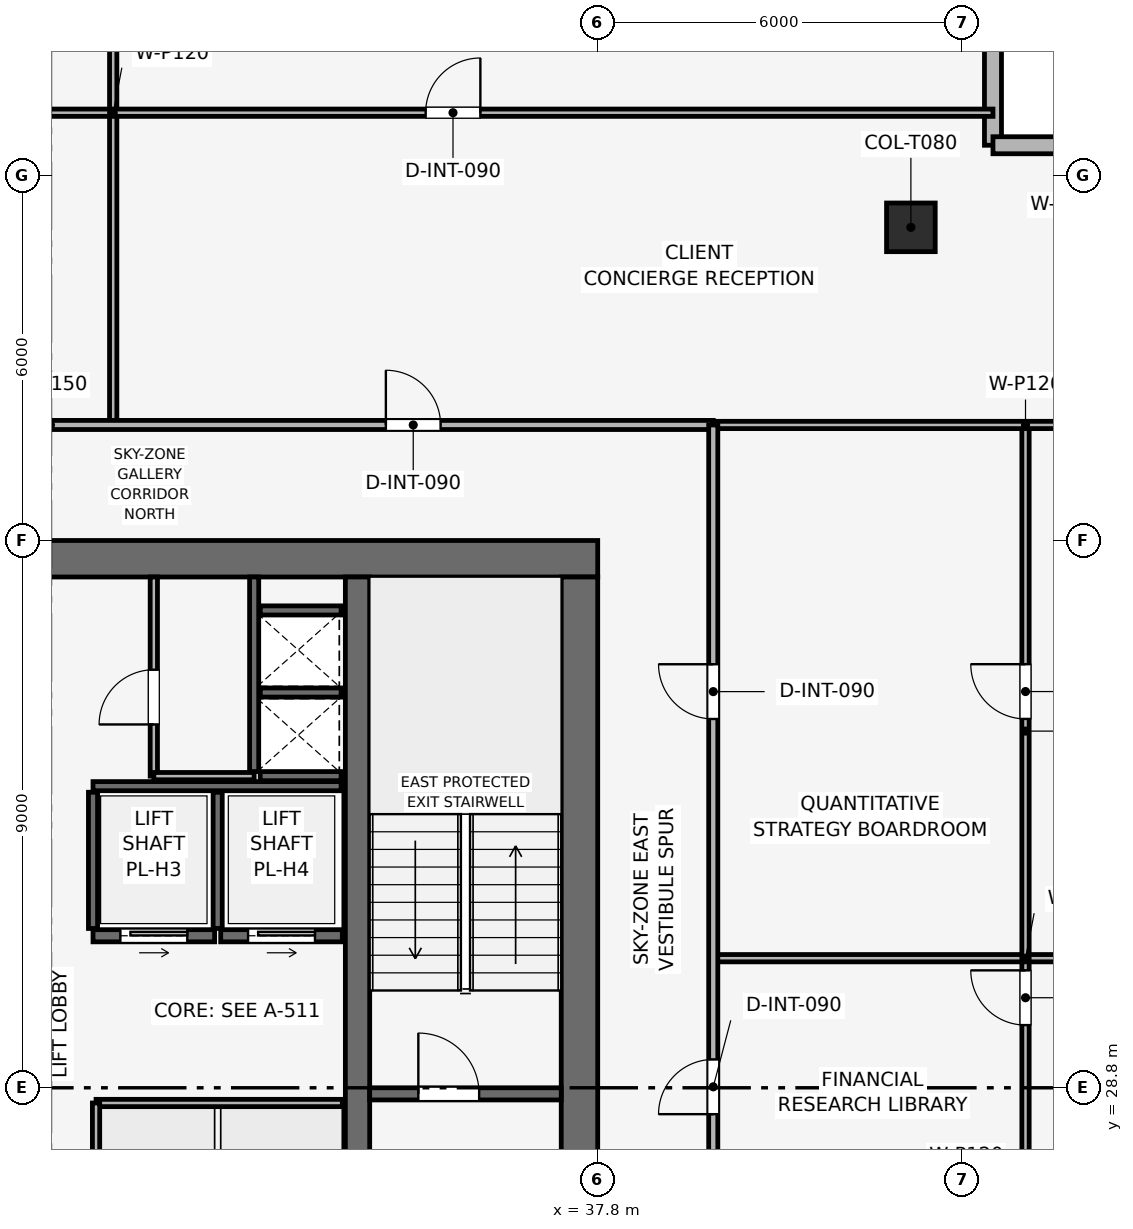
"""IFC4 building model, lengths in metres.
Left out: names, types, materials, properties, quantities, classifications, styles, units other than length and angle.
Written with IfcOpenShell. Run it as: python <this file> out.ifc"""

import sys

from ifc_helpers import new_model, si_unit, direction, frame, frame_2d, origin, origin_2d, place, context, subcontext, project, spatial, rectangle, extrude, element, fill, save


model = new_model("IFC4")
c1 = context("Model", 3, precision=1e-05, world=origin(), true_north=direction((0.0, 1.0)))
c2 = subcontext(c1, "Body", "Model", "MODEL_VIEW")
j1 = project(units=[si_unit("LENGTHUNIT", "METRE"), si_unit("PLANEANGLEUNIT", "RADIAN")], contexts=[c1])
p1 = place(None, origin())
s1 = spatial("IfcSite", under=j1, at=p1, CompositionType="ELEMENT")
p2 = place(p1, origin())
s2 = spatial("IfcBuilding", under=s1, at=p2, CompositionType="ELEMENT")
p3 = place(p2, frame((0.0, 0.0, 348.0)))
s3 = spatial("IfcBuildingStorey", under=s2, at=p3, CompositionType="ELEMENT", Elevation=348.0)
p4 = place(p3, frame((19.8, 37.5, 0.0), z_axis=(0.0, 0.0, 1.0), x_axis=(1.0, 0.0, 0.0)))
e1 = element("IfcWall", 1, at=p4, inside=s3, PredefinedType="SHEAR", context=c2, shape_type="SweptSolid", body=[
    extrude(rectangle(XDim=18.0, YDim=0.6, at=frame_2d((9.0, 0.0))), origin(), (0.0, 0.0, 1.0), 3.75),
])
p5 = place(p4, frame((7.05, 0.0, 0.0)))
e2 = element("IfcOpeningElement", 2, at=p5, cuts=e1, PredefinedType="OPENING", context=c2, shape_type="SweptSolid", body=[
    extrude(rectangle(XDim=1.1, YDim=2.15, at=frame_2d((0.55, 1.075))), frame((0.0, 0.31, 0.0), z_axis=(0.0, -1.0, 0.0), x_axis=(1.0, 0.0, 0.0)), (0.0, 0.0, 1.0), 0.62),
])
p6 = place(p3, frame((37.5, 20.4, 0.0), z_axis=(0.0, 0.0, 1.0), x_axis=(0.0, 1.0, 0.0)))
e3 = element("IfcWall", 3, at=p6, inside=s3, PredefinedType="SHEAR", context=c2, shape_type="SweptSolid", body=[
    extrude(rectangle(XDim=16.8, YDim=0.6, at=frame_2d((8.4, 0.0))), origin(), (0.0, 0.0, 1.0), 3.75),
])
p7 = place(p6, frame((4.9, 0.0, 0.0)))
e4 = element("IfcOpeningElement", 4, at=p7, cuts=e3, PredefinedType="OPENING", context=c2, shape_type="SweptSolid", body=[
    extrude(rectangle(XDim=1.1, YDim=2.15, at=frame_2d((0.55, 1.075))), frame((0.0, 0.31, 0.0), z_axis=(0.0, -1.0, 0.0), x_axis=(1.0, 0.0, 0.0)), (0.0, 0.0, 1.0), 0.62),
])
p8 = place(p3, frame((33.85, 20.4, 0.0), z_axis=(0.0, 0.0, 1.0), x_axis=(0.0, 1.0, 0.0)))
e5 = element("IfcWall", 5, at=p8, inside=s3, PredefinedType="SHEAR", context=c2, shape_type="SweptSolid", body=[
    extrude(rectangle(XDim=16.8, YDim=0.4, at=frame_2d((8.4, 0.0))), origin(), (0.0, 0.0, 1.0), 3.75),
])
p9 = place(p3, frame((42.95, 42.95, 0.003), z_axis=(0.0, 0.0, 1.0), x_axis=(1.0, 0.0, 0.0)))
e6 = element("IfcColumn", 6, at=p9, inside=s3, PredefinedType="COLUMN", context=c2, shape_type="SweptSolid", body=[
    extrude(rectangle(XDim=0.8, YDim=0.8, at=origin_2d()), origin(), (0.0, 0.0, 1.0), 3.504),
])
p10 = place(p3, frame((44.3, 49.97, 0.0), z_axis=(0.0, 0.0, 1.0), x_axis=(0.0, -1.0, 0.0)))
e7 = element("IfcWall", 7, at=p10, inside=s3, PredefinedType="SOLIDWALL", context=c2, shape_type="SweptSolid", body=[
    extrude(rectangle(XDim=5.67, YDim=0.28, at=frame_2d((2.835, 0.0))), origin(), (0.0, 0.0, 1.0), 3.51),
])
p11 = place(p10, frame((1.585, 0.0, 0.9)))
e8 = element("IfcOpeningElement", 8, at=p11, cuts=e7, PredefinedType="OPENING", context=c2, shape_type="SweptSolid", body=[
    extrude(rectangle(XDim=2.5, YDim=1.9, at=frame_2d((1.25, 0.95))), frame((0.0, 0.15, 0.0), z_axis=(0.0, -1.0, 0.0), x_axis=(1.0, 0.0, 0.0)), (0.0, 0.0, 1.0), 0.3),
])
p12 = place(p3, frame((44.3, 44.3, 0.0), z_axis=(0.0, 0.0, 1.0), x_axis=(1.0, 0.0, 0.0)))
e9 = element("IfcWall", 9, at=p12, inside=s3, PredefinedType="SOLIDWALL", context=c2, shape_type="SweptSolid", body=[
    extrude(rectangle(XDim=5.67, YDim=0.28, at=frame_2d((2.835, 0.0))), origin(), (0.0, 0.0, 1.0), 3.51),
])
p13 = place(p12, frame((1.585, 0.0, 0.9)))
e10 = element("IfcOpeningElement", 10, at=p13, cuts=e9, PredefinedType="OPENING", context=c2, shape_type="SweptSolid", body=[
    extrude(rectangle(XDim=2.5, YDim=1.9, at=frame_2d((1.25, 0.95))), frame((0.0, 0.15, 0.0), z_axis=(0.0, -1.0, 0.0), x_axis=(1.0, 0.0, 0.0)), (0.0, 0.0, 1.0), 0.3),
])
p14 = place(p3, frame((34.05, 28.7, 0.0), z_axis=(0.0, 0.0, 1.0), x_axis=(1.0, 0.0, 0.0)))
e11 = element("IfcWall", 11, at=p14, inside=s3, PredefinedType="SHEAR", context=c2, shape_type="SweptSolid", body=[
    extrude(rectangle(XDim=3.15, YDim=0.2, at=frame_2d((1.575, 0.0))), origin(), (0.0, 0.0, 1.0), 3.51),
])
p15 = place(p14, frame((0.8, 0.0, 0.0)))
e12 = element("IfcOpeningElement", 12, at=p15, cuts=e11, PredefinedType="OPENING", context=c2, shape_type="SweptSolid", body=[
    extrude(rectangle(XDim=1.0, YDim=2.1, at=frame_2d((0.5, 1.05))), frame((0.0, 0.11, 0.0), z_axis=(0.0, -1.0, 0.0), x_axis=(1.0, 0.0, 0.0)), (0.0, 0.0, 1.0), 0.22),
])
p16 = place(p3, frame((32.15, 34.0, 0.0), z_axis=(0.0, 0.0, 1.0), x_axis=(0.0, 1.0, 0.0)))
e13 = element("IfcWall", 13, at=p16, inside=s3, PredefinedType="SHEAR", context=c2, shape_type="SweptSolid", body=[
    extrude(rectangle(XDim=3.2, YDim=0.15, at=frame_2d((1.6, 0.0))), origin(), (0.0, 0.0, 1.0), 3.51),
])
for number, where, z_axis, x_axis in (
    (14, (32.25, 33.925, 0.0), (0.0, 0.0, 1.0), (1.0, 0.0, 0.0)),
    (15, (32.25, 35.3, 0.0), (0.0, 0.0, 1.0), (1.0, 0.0, 0.0)),
):
    element("IfcWall", number, at=place(p3, frame(where, z_axis=z_axis, x_axis=x_axis)), inside=s3, PredefinedType="SHEAR", context=c2, shape_type="SweptSolid", body=[
        extrude(rectangle(XDim=1.33, YDim=0.15, at=frame_2d((0.665, 0.0))), origin(), (0.0, 0.0, 1.0), 3.51),
    ])
p17 = place(p3, frame((29.5, 31.3, 0.0), z_axis=(0.0, 0.0, 1.0), x_axis=(1.0, 0.0, 0.0)))
e16 = element("IfcWall", 16, at=p17, inside=s3, PredefinedType="SHEAR", context=c2, shape_type="SweptSolid", body=[
    extrude(rectangle(XDim=2.0, YDim=0.2, at=frame_2d((1.0, 0.0))), origin(), (0.0, 0.0, 1.0), 3.51),
])
p18 = place(p17, frame((0.45, 0.0, 0.0)))
e17 = element("IfcOpeningElement", 17, at=p18, cuts=e16, PredefinedType="OPENING", context=c2, shape_type="SweptSolid", body=[
    extrude(rectangle(XDim=1.1, YDim=2.15, at=frame_2d((0.55, 1.075))), frame((0.0, 0.11, 0.0), z_axis=(0.0, -1.0, 0.0), x_axis=(1.0, 0.0, 0.0)), (0.0, 0.0, 1.0), 0.22),
])
p19 = place(p3, frame((31.6, 31.3, 0.0), z_axis=(0.0, 0.0, 1.0), x_axis=(1.0, 0.0, 0.0)))
e18 = element("IfcWall", 18, at=p19, inside=s3, PredefinedType="SHEAR", context=c2, shape_type="SweptSolid", body=[
    extrude(rectangle(XDim=2.0, YDim=0.2, at=frame_2d((1.0, 0.0))), origin(), (0.0, 0.0, 1.0), 3.51),
])
p20 = place(p19, frame((0.45, 0.0, 0.0)))
e19 = element("IfcOpeningElement", 19, at=p20, cuts=e18, PredefinedType="OPENING", context=c2, shape_type="SweptSolid", body=[
    extrude(rectangle(XDim=1.1, YDim=2.15, at=frame_2d((0.55, 1.075))), frame((0.0, 0.11, 0.0), z_axis=(0.0, -1.0, 0.0), x_axis=(1.0, 0.0, 0.0)), (0.0, 0.0, 1.0), 0.22),
])
p21 = place(p3, frame((32.25, 36.65, 0.0), z_axis=(0.0, 0.0, 1.0), x_axis=(1.0, 0.0, 0.0)))
e20 = element("IfcWall", 20, at=p21, inside=s3, PredefinedType="SHEAR", context=c2, shape_type="SweptSolid", body=[
    extrude(rectangle(XDim=1.33, YDim=0.15, at=frame_2d((0.665, 0.0))), origin(), (0.0, 0.0, 1.0), 3.51),
])
p22 = place(p3, frame((29.5, 33.76, 0.0), z_axis=(0.0, 0.0, 1.0), x_axis=(1.0, 0.0, 0.0)))
e21 = element("IfcWall", 21, at=p22, inside=s3, PredefinedType="SHEAR", context=c2, shape_type="SweptSolid", body=[
    extrude(rectangle(XDim=4.08, YDim=0.15, at=frame_2d((2.04, 0.0))), origin(), (0.0, 0.0, 1.0), 3.51),
])
for number, where, z_axis, x_axis in (
    (22, (29.5, 31.42, 0.0), (0.0, 0.0, 1.0), (0.0, 1.0, 0.0)),
    (23, (31.55, 31.42, 0.0), (0.0, 0.0, 1.0), (0.0, 1.0, 0.0)),
):
    element("IfcWall", number, at=place(p3, frame(where, z_axis=z_axis, x_axis=x_axis)), inside=s3, PredefinedType="SHEAR", context=c2, shape_type="SweptSolid", body=[
        extrude(rectangle(XDim=2.24, YDim=0.15, at=frame_2d((1.12, 0.0))), origin(), (0.0, 0.0, 1.0), 3.51),
    ])
p23 = place(p3, frame((30.5, 33.925, 0.0), z_axis=(0.0, 0.0, 1.0), x_axis=(0.0, 1.0, 0.0)))
e24 = element("IfcWall", 24, at=p23, inside=s3, PredefinedType="PARTITIONING", context=c2, shape_type="SweptSolid", body=[
    extrude(rectangle(XDim=3.275, YDim=0.12, at=frame_2d((1.637, 0.0))), origin(), (0.0, 0.0, 1.0), 3.51),
])
p24 = place(p23, frame((0.85, 0.0, 0.0)))
e25 = element("IfcOpeningElement", 25, at=p24, cuts=e24, PredefinedType="OPENING", context=c2, shape_type="SweptSolid", body=[
    extrude(rectangle(XDim=0.9, YDim=2.1, at=frame_2d((0.45, 1.05))), frame((0.0, 0.07, 0.0), z_axis=(0.0, -1.0, 0.0), x_axis=(1.0, 0.0, 0.0)), (0.0, 0.0, 1.0), 0.14),
])
p25 = place(p3, frame((30.5, 33.925, 0.0), z_axis=(0.0, 0.0, 1.0), x_axis=(1.0, 0.0, 0.0)))
e26 = element("IfcWall", 26, at=p25, inside=s3, PredefinedType="PARTITIONING", context=c2, shape_type="SweptSolid", body=[
    extrude(rectangle(XDim=1.65, YDim=0.12, at=frame_2d((0.825, 0.0))), origin(), (0.0, 0.0, 1.0), 3.51),
])
p26 = place(p3, frame((29.55, 28.55, 0.0), z_axis=(0.0, 0.0, 1.0), x_axis=(1.0, 0.0, 0.0)))
e27 = element("IfcWall", 27, at=p26, inside=s3, PredefinedType="PARTITIONING", context=c2, shape_type="SweptSolid", body=[
    extrude(rectangle(XDim=4.05, YDim=0.12, at=frame_2d((2.025, 0.0))), origin(), (0.0, 0.0, 1.0), 3.51),
])
p27 = place(p3, frame((29.55, 25.95, 0.0), z_axis=(0.0, 0.0, 1.0), x_axis=(0.0, 1.0, 0.0)))
e28 = element("IfcWall", 28, at=p27, inside=s3, PredefinedType="PARTITIONING", context=c2, shape_type="SweptSolid", body=[
    extrude(rectangle(XDim=2.6, YDim=0.12, at=frame_2d((1.3, 0.0))), origin(), (0.0, 0.0, 1.0), 3.51),
])
p28 = place(p3, frame((13.3, 44.835, 0.0), z_axis=(0.0, 0.0, 1.0), x_axis=(1.0, 0.0, 0.0)))
e29 = element("IfcWall", 29, at=p28, inside=s3, PredefinedType="PARTITIONING", context=c2, shape_type="SweptSolid", body=[
    extrude(rectangle(XDim=16.532, YDim=0.12, at=frame_2d((8.266, 0.0))), origin(), (0.0, 0.0, 1.0), 3.095),
])
p29 = place(p28, frame((8.451, 0.0, 0.0)))
e30 = element("IfcOpeningElement", 30, at=p29, cuts=e29, PredefinedType="OPENING", context=c2, shape_type="SweptSolid", body=[
    extrude(rectangle(XDim=0.9, YDim=2.1, at=frame_2d((0.45, 1.05))), frame((0.0, 0.07, 0.0), z_axis=(0.0, -1.0, 0.0), x_axis=(1.0, 0.0, 0.0)), (0.0, 0.0, 1.0), 0.14),
])
p30 = place(p3, frame((29.832, 39.7, 0.0), z_axis=(0.0, 0.0, 1.0), x_axis=(0.0, 1.0, 0.0)))
e31 = element("IfcWall", 31, at=p30, inside=s3, PredefinedType="PARTITIONING", context=c2, shape_type="SweptSolid", body=[
    extrude(rectangle(XDim=10.27, YDim=0.12, at=frame_2d((5.135, 0.0))), origin(), (0.0, 0.0, 1.0), 3.135),
])
p31 = place(p3, frame((29.832, 44.835, 0.0), z_axis=(0.0, 0.0, 1.0), x_axis=(1.0, 0.0, 0.0)))
e32 = element("IfcWall", 32, at=p31, inside=s3, PredefinedType="PARTITIONING", context=c2, shape_type="SweptSolid", body=[
    extrude(rectangle(XDim=14.468, YDim=0.12, at=frame_2d((7.234, 0.0))), origin(), (0.0, 0.0, 1.0), 3.095),
])
p32 = place(p31, frame((5.138, 0.0, 0.0)))
e33 = element("IfcOpeningElement", 33, at=p32, cuts=e32, PredefinedType="OPENING", context=c2, shape_type="SweptSolid", body=[
    extrude(rectangle(XDim=0.9, YDim=2.1, at=frame_2d((0.45, 1.05))), frame((0.0, 0.07, 0.0), z_axis=(0.0, -1.0, 0.0), x_axis=(1.0, 0.0, 0.0)), (0.0, 0.0, 1.0), 0.14),
])
p33 = place(p3, frame((44.835, 26.7, 0.0), z_axis=(0.0, 0.0, 1.0), x_axis=(0.0, 1.0, 0.0)))
e34 = element("IfcWall", 34, at=p33, inside=s3, PredefinedType="PARTITIONING", context=c2, shape_type="SweptSolid", body=[
    extrude(rectangle(XDim=4.231, YDim=0.12, at=frame_2d((2.115, 0.0))), origin(), (0.0, 0.0, 1.0), 3.095),
])
p34 = place(p33, frame((3.131, 0.0, 0.0)))
e35 = element("IfcOpeningElement", 35, at=p34, cuts=e34, PredefinedType="OPENING", context=c2, shape_type="SweptSolid", body=[
    extrude(rectangle(XDim=0.9, YDim=2.1, at=frame_2d((0.45, 1.05))), frame((0.0, 0.07, 0.0), z_axis=(0.0, -1.0, 0.0), x_axis=(1.0, 0.0, 0.0)), (0.0, 0.0, 1.0), 0.14),
])
p35 = place(p3, frame((39.7, 30.931, 0.0), z_axis=(0.0, 0.0, 1.0), x_axis=(1.0, 0.0, 0.0)))
e36 = element("IfcWall", 36, at=p35, inside=s3, PredefinedType="PARTITIONING", context=c2, shape_type="SweptSolid", body=[
    extrude(rectangle(XDim=10.27, YDim=0.12, at=frame_2d((5.135, 0.0))), origin(), (0.0, 0.0, 1.0), 3.135),
])
p36 = place(p3, frame((44.835, 30.931, 0.0), z_axis=(0.0, 0.0, 1.0), x_axis=(0.0, 1.0, 0.0)))
e37 = element("IfcWall", 37, at=p36, inside=s3, PredefinedType="PARTITIONING", context=c2, shape_type="SweptSolid", body=[
    extrude(rectangle(XDim=8.769, YDim=0.12, at=frame_2d((4.385, 0.0))), origin(), (0.0, 0.0, 1.0), 3.095),
])
p37 = place(p36, frame((3.935, 0.0, 0.0)))
e38 = element("IfcOpeningElement", 38, at=p37, cuts=e37, PredefinedType="OPENING", context=c2, shape_type="SweptSolid", body=[
    extrude(rectangle(XDim=0.9, YDim=2.1, at=frame_2d((0.45, 1.05))), frame((0.0, 0.07, 0.0), z_axis=(0.0, -1.0, 0.0), x_axis=(1.0, 0.0, 0.0)), (0.0, 0.0, 1.0), 0.14),
])
p38 = place(p3, frame((39.7, 39.7, 0.0), z_axis=(0.0, 0.0, 1.0), x_axis=(1.0, 0.0, 0.0)))
e39 = element("IfcWall", 39, at=p38, inside=s3, PredefinedType="PARTITIONING", context=c2, shape_type="SweptSolid", body=[
    extrude(rectangle(XDim=10.27, YDim=0.12, at=frame_2d((5.135, 0.0))), origin(), (0.0, 0.0, 1.0), 3.095),
])
p39 = place(p3, frame((17.9, 39.7, 0.0), z_axis=(0.0, 0.0, 1.0), x_axis=(1.0, 0.0, 0.0)))
e40 = element("IfcWall", 40, at=p39, inside=s3, PredefinedType="PARTITIONING", context=c2, shape_type="SweptSolid", body=[
    extrude(rectangle(XDim=21.8, YDim=0.15, at=frame_2d((10.9, 0.0))), origin(), (0.0, 0.0, 1.0), 3.095),
])
p40 = place(p39, frame((5.516, 0.0, 0.0)))
e41 = element("IfcOpeningElement", 41, at=p40, cuts=e40, PredefinedType="OPENING", context=c2, shape_type="SweptSolid", body=[
    extrude(rectangle(XDim=0.9, YDim=2.1, at=frame_2d((0.45, 1.05))), frame((0.0, 0.085, 0.0), z_axis=(0.0, -1.0, 0.0), x_axis=(1.0, 0.0, 0.0)), (0.0, 0.0, 1.0), 0.17),
])
p41 = place(p39, frame((16.416, 0.0, 0.0)))
e42 = element("IfcOpeningElement", 42, at=p41, cuts=e40, PredefinedType="OPENING", context=c2, shape_type="SweptSolid", body=[
    extrude(rectangle(XDim=0.9, YDim=2.1, at=frame_2d((0.45, 1.05))), frame((0.0, 0.085, 0.0), z_axis=(0.0, -1.0, 0.0), x_axis=(1.0, 0.0, 0.0)), (0.0, 0.0, 1.0), 0.17),
])
p42 = place(p3, frame((39.7, 24.4, 0.0), z_axis=(0.0, 0.0, 1.0), x_axis=(0.0, 1.0, 0.0)))
e43 = element("IfcWall", 43, at=p42, inside=s3, PredefinedType="PARTITIONING", context=c2, shape_type="SweptSolid", body=[
    extrude(rectangle(XDim=15.3, YDim=0.15, at=frame_2d((7.65, 0.0))), origin(), (0.0, 0.0, 1.0), 3.095),
])
p43 = place(p42, frame((0.7, 0.0, 0.0)))
e44 = element("IfcOpeningElement", 44, at=p43, cuts=e43, PredefinedType="OPENING", context=c2, shape_type="SweptSolid", body=[
    extrude(rectangle(XDim=0.9, YDim=2.1, at=frame_2d((0.45, 1.05))), frame((0.0, 0.085, 0.0), z_axis=(0.0, -1.0, 0.0), x_axis=(1.0, 0.0, 0.0)), (0.0, 0.0, 1.0), 0.17),
])
p44 = place(p42, frame((3.966, 0.0, 0.0)))
e45 = element("IfcOpeningElement", 45, at=p44, cuts=e43, PredefinedType="OPENING", context=c2, shape_type="SweptSolid", body=[
    extrude(rectangle(XDim=0.9, YDim=2.1, at=frame_2d((0.45, 1.05))), frame((0.0, 0.085, 0.0), z_axis=(0.0, -1.0, 0.0), x_axis=(1.0, 0.0, 0.0)), (0.0, 0.0, 1.0), 0.17),
])
p45 = place(p42, frame((10.465, 0.0, 0.0)))
e46 = element("IfcOpeningElement", 46, at=p45, cuts=e43, PredefinedType="OPENING", context=c2, shape_type="SweptSolid", body=[
    extrude(rectangle(XDim=0.9, YDim=2.1, at=frame_2d((0.45, 1.05))), frame((0.0, 0.085, 0.0), z_axis=(0.0, -1.0, 0.0), x_axis=(1.0, 0.0, 0.0)), (0.0, 0.0, 1.0), 0.17),
])
p46 = place(p15, origin())
e47 = element("IfcDoor", 47, at=p46, inside=s3, OperationType="SINGLE_SWING_LEFT", PredefinedType="DOOR", context=c2, shape_type="SweptSolid", body=[
    extrude(rectangle(XDim=1.0, YDim=2.1, at=frame_2d((0.5, 1.05))), frame((0.0, 0.025, 0.0), z_axis=(0.0, -1.0, 0.0), x_axis=(1.0, 0.0, 0.0)), (0.0, 0.0, 1.0), 0.05),
])
fill(e12, e47)
p47 = place(p18, origin())
e48 = element("IfcDoor", 48, at=p47, inside=s3, OperationType="SLIDING_TO_RIGHT", PredefinedType="DOOR", context=c2, shape_type="SweptSolid", body=[
    extrude(rectangle(XDim=1.1, YDim=2.15, at=frame_2d((0.55, 1.075))), frame((0.0, 0.025, 0.0), z_axis=(0.0, -1.0, 0.0), x_axis=(1.0, 0.0, 0.0)), (0.0, 0.0, 1.0), 0.05),
])
fill(e17, e48)
p48 = place(p20, origin())
e49 = element("IfcDoor", 49, at=p48, inside=s3, OperationType="SLIDING_TO_RIGHT", PredefinedType="DOOR", context=c2, shape_type="SweptSolid", body=[
    extrude(rectangle(XDim=1.1, YDim=2.15, at=frame_2d((0.55, 1.075))), frame((0.0, 0.025, 0.0), z_axis=(0.0, -1.0, 0.0), x_axis=(1.0, 0.0, 0.0)), (0.0, 0.0, 1.0), 0.05),
])
fill(e19, e49)
p49 = place(p24, origin())
e50 = element("IfcDoor", 50, at=p49, inside=s3, OperationType="SINGLE_SWING_LEFT", PredefinedType="DOOR", context=c2, shape_type="SweptSolid", body=[
    extrude(rectangle(XDim=0.9, YDim=2.1, at=frame_2d((0.45, 1.05))), frame((0.0, 0.025, 0.0), z_axis=(0.0, -1.0, 0.0), x_axis=(1.0, 0.0, 0.0)), (0.0, 0.0, 1.0), 0.05),
])
fill(e25, e50)
p50 = place(p32, origin())
e51 = element("IfcDoor", 51, at=p50, inside=s3, OperationType="SINGLE_SWING_RIGHT", PredefinedType="DOOR", context=c2, shape_type="SweptSolid", body=[
    extrude(rectangle(XDim=0.9, YDim=2.1, at=frame_2d((0.45, 1.05))), frame((0.0, 0.025, 0.0), z_axis=(0.0, -1.0, 0.0), x_axis=(1.0, 0.0, 0.0)), (0.0, 0.0, 1.0), 0.05),
])
fill(e33, e51)
p51 = place(p34, origin())
e52 = element("IfcDoor", 52, at=p51, inside=s3, OperationType="SINGLE_SWING_RIGHT", PredefinedType="DOOR", context=c2, shape_type="SweptSolid", body=[
    extrude(rectangle(XDim=0.9, YDim=2.1, at=frame_2d((0.45, 1.05))), frame((0.0, 0.025, 0.0), z_axis=(0.0, -1.0, 0.0), x_axis=(1.0, 0.0, 0.0)), (0.0, 0.0, 1.0), 0.05),
])
fill(e35, e52)
p52 = place(p37, origin())
e53 = element("IfcDoor", 53, at=p52, inside=s3, OperationType="SINGLE_SWING_RIGHT", PredefinedType="DOOR", context=c2, shape_type="SweptSolid", body=[
    extrude(rectangle(XDim=0.9, YDim=2.1, at=frame_2d((0.45, 1.05))), frame((0.0, 0.025, 0.0), z_axis=(0.0, -1.0, 0.0), x_axis=(1.0, 0.0, 0.0)), (0.0, 0.0, 1.0), 0.05),
])
fill(e38, e53)
p53 = place(p41, origin())
e54 = element("IfcDoor", 54, at=p53, inside=s3, OperationType="SINGLE_SWING_LEFT", PredefinedType="DOOR", context=c2, shape_type="SweptSolid", body=[
    extrude(rectangle(XDim=0.9, YDim=2.1, at=frame_2d((0.45, 1.05))), frame((0.0, 0.025, 0.0), z_axis=(0.0, -1.0, 0.0), x_axis=(1.0, 0.0, 0.0)), (0.0, 0.0, 1.0), 0.05),
])
fill(e42, e54)
p54 = place(p44, origin())
e55 = element("IfcDoor", 55, at=p54, inside=s3, OperationType="SINGLE_SWING_LEFT", PredefinedType="DOOR", context=c2, shape_type="SweptSolid", body=[
    extrude(rectangle(XDim=0.9, YDim=2.1, at=frame_2d((0.45, 1.05))), frame((0.0, 0.025, 0.0), z_axis=(0.0, -1.0, 0.0), x_axis=(1.0, 0.0, 0.0)), (0.0, 0.0, 1.0), 0.05),
])
fill(e45, e55)
p55 = place(p45, origin())
e56 = element("IfcDoor", 56, at=p55, inside=s3, OperationType="SINGLE_SWING_RIGHT", PredefinedType="DOOR", context=c2, shape_type="SweptSolid", body=[
    extrude(rectangle(XDim=0.9, YDim=2.1, at=frame_2d((0.45, 1.05))), frame((0.0, 0.025, 0.0), z_axis=(0.0, -1.0, 0.0), x_axis=(1.0, 0.0, 0.0)), (0.0, 0.0, 1.0), 0.05),
])
fill(e46, e56)
save(model, sys.argv[1])
